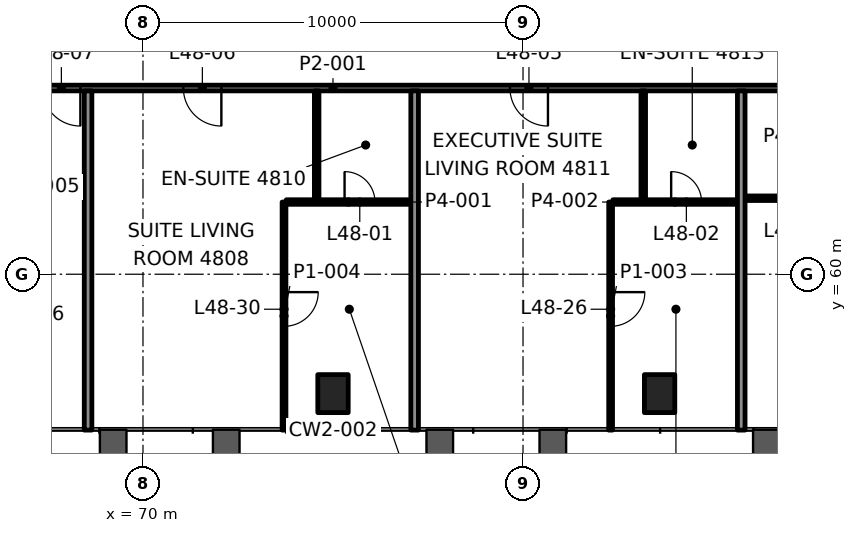
"""IFC4 building model, lengths in metres.
Left out: names, types, materials, properties, quantities, classifications, styles, units other than length and angle.
Written with IfcOpenShell. Run it as: python <this file> out.ifc"""

import sys

from ifc_helpers import new_model, si_unit, direction, frame, frame_2d, origin, origin_2d, place, context, subcontext, project, spatial, rectangle, hollow_rectangle, extrude, element, fill, save


model = new_model("IFC4")
c1 = context("Model", 3, precision=1e-05, world=origin(), true_north=direction((0.0, 1.0)))
c2 = subcontext(c1, "Body", "Model", "MODEL_VIEW")
j1 = project(units=[si_unit("LENGTHUNIT", "METRE"), si_unit("PLANEANGLEUNIT", "RADIAN")], contexts=[c1])
p1 = place(None, origin())
s1 = spatial("IfcSite", under=j1, at=p1, CompositionType="ELEMENT")
p2 = place(p1, origin())
s2 = spatial("IfcBuilding", under=s1, at=p2, CompositionType="ELEMENT")
p3 = place(p2, frame((0.0, 0.0, 206.5)))
s3 = spatial("IfcBuildingStorey", under=s2, at=p3, CompositionType="ELEMENT", Elevation=206.5)
for number, where, z_axis, x_axis in (
    (1, (75.0, 56.858, -0.0), (0.0, 0.0, 1.0), (1.0, 0.0, 0.0)),
    (2, (83.594, 56.858, -0.0), (0.0, 0.0, 1.0), (1.0, 0.0, 0.0)),
):
    element("IfcColumn", number, at=place(p3, frame(where, z_axis=z_axis, x_axis=x_axis)), inside=s3, PredefinedType="COLUMN", context=c2, shape_type="SweptSolid", body=[
        extrude(hollow_rectangle(XDim=0.8, YDim=1.0, WallThickness=0.05, at=origin_2d()), origin(), (0.0, 0.0, 1.0), 3.9),
    ])
p4 = place(p3, frame((73.771, 61.9, 0.0), z_axis=(0.0, 0.0, 1.0), x_axis=(1.0, 0.0, 0.0)))
e3 = element("IfcWall", 3, at=p4, inside=s3, PredefinedType="PARTITIONING", context=c2, shape_type="SweptSolid", body=[
    extrude(rectangle(XDim=3.267, YDim=0.12, at=frame_2d((1.634, 0.0))), origin(), (0.0, 0.0, 1.0), 3.1),
])
p5 = place(p4, frame((1.533, 0.0, 0.0)))
e4 = element("IfcOpeningElement", 4, at=p5, cuts=e3, PredefinedType="OPENING", context=c2, shape_type="SweptSolid", body=[
    extrude(rectangle(XDim=0.8, YDim=2.1, at=frame_2d((0.4, 1.05))), frame((0.0, 0.07, 0.0), z_axis=(0.0, -1.0, 0.0), x_axis=(1.0, 0.0, 0.0)), (0.0, 0.0, 1.0), 0.14),
])
p6 = place(p3, frame((82.365, 61.9, 0.0), z_axis=(0.0, 0.0, 1.0), x_axis=(1.0, 0.0, 0.0)))
e5 = element("IfcWall", 5, at=p6, inside=s3, PredefinedType="PARTITIONING", context=c2, shape_type="SweptSolid", body=[
    extrude(rectangle(XDim=3.267, YDim=0.12, at=frame_2d((1.634, 0.0))), origin(), (0.0, 0.0, 1.0), 3.1),
])
p7 = place(p6, frame((1.533, 0.0, 0.0)))
e6 = element("IfcOpeningElement", 6, at=p7, cuts=e5, PredefinedType="OPENING", context=c2, shape_type="SweptSolid", body=[
    extrude(rectangle(XDim=0.8, YDim=2.1, at=frame_2d((0.4, 1.05))), frame((0.0, 0.07, 0.0), z_axis=(0.0, -1.0, 0.0), x_axis=(1.0, 0.0, 0.0)), (0.0, 0.0, 1.0), 0.14),
])
p8 = place(p3, frame((85.842, 62.0, 0.0), z_axis=(0.0, 0.0, 1.0), x_axis=(1.0, 0.0, 0.0)))
e7 = element("IfcWall", 7, at=p8, inside=s3, PredefinedType="PARTITIONING", context=c2, shape_type="SweptSolid", body=[
    extrude(rectangle(XDim=2.725, YDim=0.12, at=frame_2d((1.363, 0.0))), origin(), (0.0, 0.0, 1.0), 3.1),
])
p9 = place(p8, frame((0.963, 0.0, 0.0)))
e8 = element("IfcOpeningElement", 8, at=p9, cuts=e7, PredefinedType="OPENING", context=c2, shape_type="SweptSolid", body=[
    extrude(rectangle(XDim=0.8, YDim=2.1, at=frame_2d((0.4, 1.05))), frame((0.0, 0.07, 0.0), z_axis=(0.0, -1.0, 0.0), x_axis=(1.0, 0.0, 0.0)), (0.0, 0.0, 1.0), 0.14),
])
p10 = place(p3, frame((88.1, 64.9, 0.0), z_axis=(0.0, 0.0, 1.0), x_axis=(-1.0, 0.0, 0.0)))
e9 = element("IfcWall", 9, at=p10, inside=s3, PredefinedType="PARTITIONING", context=c2, shape_type="SweptSolid", body=[
    extrude(rectangle(XDim=26.2, YDim=0.15, at=frame_2d((13.1, 0.0))), origin(), (0.0, 0.0, 1.0), 3.1),
])
p11 = place(p10, frame((7.443, 0.0, 0.0)))
e10 = element("IfcOpeningElement", 10, at=p11, cuts=e9, PredefinedType="OPENING", context=c2, shape_type="SweptSolid", body=[
    extrude(rectangle(XDim=1.0, YDim=2.1, at=frame_2d((0.5, 1.05))), frame((0.0, 0.085, 0.0), z_axis=(0.0, -1.0, 0.0), x_axis=(1.0, 0.0, 0.0)), (0.0, 0.0, 1.0), 0.17),
])
p12 = place(p10, frame((16.037, 0.0, 0.0)))
e11 = element("IfcOpeningElement", 11, at=p12, cuts=e9, PredefinedType="OPENING", context=c2, shape_type="SweptSolid", body=[
    extrude(rectangle(XDim=1.0, YDim=2.1, at=frame_2d((0.5, 1.05))), frame((0.0, 0.085, 0.0), z_axis=(0.0, -1.0, 0.0), x_axis=(1.0, 0.0, 0.0)), (0.0, 0.0, 1.0), 0.17),
])
p13 = place(p10, frame((19.747, 0.0, 0.0)))
e12 = element("IfcOpeningElement", 12, at=p13, cuts=e9, PredefinedType="OPENING", context=c2, shape_type="SweptSolid", body=[
    extrude(rectangle(XDim=1.0, YDim=2.1, at=frame_2d((0.5, 1.05))), frame((0.0, 0.085, 0.0), z_axis=(0.0, -1.0, 0.0), x_axis=(1.0, 0.0, 0.0)), (0.0, 0.0, 1.0), 0.17),
])
p14 = place(p10, frame((24.013, 0.0, 0.0)))
e13 = element("IfcOpeningElement", 13, at=p14, cuts=e9, PredefinedType="OPENING", context=c2, shape_type="SweptSolid", body=[
    extrude(rectangle(XDim=1.0, YDim=2.1, at=frame_2d((0.5, 1.05))), frame((0.0, 0.085, 0.0), z_axis=(0.0, -1.0, 0.0), x_axis=(1.0, 0.0, 0.0)), (0.0, 0.0, 1.0), 0.17),
])
p15 = place(p3, frame((85.742, 55.898, 0.0), z_axis=(0.0, 0.0, 1.0), x_axis=(0.0, 1.0, 0.0)))
e14 = element("IfcWall", 14, at=p15, inside=s3, PredefinedType="PARTITIONING", context=c2, shape_type="SweptSolid", body=[
    extrude(rectangle(XDim=8.927, YDim=0.2, at=frame_2d((4.463, 0.0))), origin(), (0.0, 0.0, 1.0), 3.022),
])
p16 = place(p3, frame((83.164, 61.96, 0.0), z_axis=(0.0, 0.0, 1.0), x_axis=(0.0, 1.0, 0.0)))
e15 = element("IfcWall", 15, at=p16, inside=s3, PredefinedType="PARTITIONING", context=c2, shape_type="SweptSolid", body=[
    extrude(rectangle(XDim=2.865, YDim=0.12, at=frame_2d((1.433, 0.0))), origin(), (0.0, 0.0, 1.0), 3.1),
])
p17 = place(p3, frame((82.305, 61.9, 0.0), z_axis=(0.0, 0.0, 1.0), x_axis=(0.0, -1.0, 0.0)))
e16 = element("IfcWall", 16, at=p17, inside=s3, PredefinedType="PARTITIONING", context=c2, shape_type="SweptSolid", body=[
    extrude(rectangle(XDim=6.002, YDim=0.1, at=frame_2d((3.001, 0.0))), origin(), (0.0, 0.0, 1.0), 3.022),
])
p18 = place(p17, frame((2.371, 0.0, 0.0)))
e17 = element("IfcOpeningElement", 17, at=p18, cuts=e16, PredefinedType="OPENING", context=c2, shape_type="SweptSolid", body=[
    extrude(rectangle(XDim=0.9, YDim=2.1, at=frame_2d((0.45, 1.05))), frame((0.0, 0.06, 0.0), z_axis=(0.0, -1.0, 0.0), x_axis=(1.0, 0.0, 0.0)), (0.0, 0.0, 1.0), 0.12),
])
p19 = place(p3, frame((77.148, 55.898, 0.0), z_axis=(0.0, 0.0, 1.0), x_axis=(0.0, 1.0, 0.0)))
e18 = element("IfcWall", 18, at=p19, inside=s3, PredefinedType="PARTITIONING", context=c2, shape_type="SweptSolid", body=[
    extrude(rectangle(XDim=8.927, YDim=0.2, at=frame_2d((4.463, 0.0))), origin(), (0.0, 0.0, 1.0), 3.022),
])
p20 = place(p3, frame((74.57, 61.96, 0.0), z_axis=(0.0, 0.0, 1.0), x_axis=(0.0, 1.0, 0.0)))
e19 = element("IfcWall", 19, at=p20, inside=s3, PredefinedType="PARTITIONING", context=c2, shape_type="SweptSolid", body=[
    extrude(rectangle(XDim=2.865, YDim=0.12, at=frame_2d((1.433, 0.0))), origin(), (0.0, 0.0, 1.0), 3.1),
])
p21 = place(p3, frame((73.711, 61.9, 0.0), z_axis=(0.0, 0.0, 1.0), x_axis=(0.0, -1.0, 0.0)))
e20 = element("IfcWall", 20, at=p21, inside=s3, PredefinedType="PARTITIONING", context=c2, shape_type="SweptSolid", body=[
    extrude(rectangle(XDim=6.002, YDim=0.1, at=frame_2d((3.001, 0.0))), origin(), (0.0, 0.0, 1.0), 3.022),
])
p22 = place(p21, frame((2.371, 0.0, 0.0)))
e21 = element("IfcOpeningElement", 21, at=p22, cuts=e20, PredefinedType="OPENING", context=c2, shape_type="SweptSolid", body=[
    extrude(rectangle(XDim=0.9, YDim=2.1, at=frame_2d((0.45, 1.05))), frame((0.0, 0.06, 0.0), z_axis=(0.0, -1.0, 0.0), x_axis=(1.0, 0.0, 0.0)), (0.0, 0.0, 1.0), 0.12),
])
p23 = place(p3, frame((68.555, 55.898, 0.0), z_axis=(0.0, 0.0, 1.0), x_axis=(0.0, 1.0, 0.0)))
e22 = element("IfcWall", 22, at=p23, inside=s3, PredefinedType="PARTITIONING", context=c2, shape_type="SweptSolid", body=[
    extrude(rectangle(XDim=8.927, YDim=0.2, at=frame_2d((4.463, 0.0))), origin(), (0.0, 0.0, 1.0), 3.022),
])
p24 = place(p5, origin())
e23 = element("IfcDoor", 23, at=p24, inside=s3, OperationType="SINGLE_SWING_LEFT", PredefinedType="DOOR", context=c2, shape_type="SweptSolid", body=[
    extrude(rectangle(XDim=0.8, YDim=2.1, at=frame_2d((0.4, 1.05))), frame((0.0, 0.025, 0.0), z_axis=(0.0, -1.0, 0.0), x_axis=(1.0, 0.0, 0.0)), (0.0, 0.0, 1.0), 0.05),
])
fill(e4, e23)
p25 = place(p7, origin())
e24 = element("IfcDoor", 24, at=p25, inside=s3, OperationType="SINGLE_SWING_RIGHT", PredefinedType="DOOR", context=c2, shape_type="SweptSolid", body=[
    extrude(rectangle(XDim=0.8, YDim=2.1, at=frame_2d((0.4, 1.05))), frame((0.0, 0.025, 0.0), z_axis=(0.0, -1.0, 0.0), x_axis=(1.0, 0.0, 0.0)), (0.0, 0.0, 1.0), 0.05),
])
fill(e6, e24)
p26 = place(p11, origin())
e25 = element("IfcDoor", 25, at=p26, inside=s3, OperationType="SINGLE_SWING_LEFT", PredefinedType="DOOR", context=c2, shape_type="SweptSolid", body=[
    extrude(rectangle(XDim=1.0, YDim=2.1, at=frame_2d((0.5, 1.05))), frame((0.0, 0.025, 0.0), z_axis=(0.0, -1.0, 0.0), x_axis=(1.0, 0.0, 0.0)), (0.0, 0.0, 1.0), 0.05),
])
fill(e10, e25)
p27 = place(p12, origin())
e26 = element("IfcDoor", 26, at=p27, inside=s3, OperationType="SINGLE_SWING_RIGHT", PredefinedType="DOOR", context=c2, shape_type="SweptSolid", body=[
    extrude(rectangle(XDim=1.0, YDim=2.1, at=frame_2d((0.5, 1.05))), frame((0.0, 0.025, 0.0), z_axis=(0.0, -1.0, 0.0), x_axis=(1.0, 0.0, 0.0)), (0.0, 0.0, 1.0), 0.05),
])
fill(e11, e26)
p28 = place(p13, origin())
e27 = element("IfcDoor", 27, at=p28, inside=s3, OperationType="SINGLE_SWING_RIGHT", PredefinedType="DOOR", context=c2, shape_type="SweptSolid", body=[
    extrude(rectangle(XDim=1.0, YDim=2.1, at=frame_2d((0.5, 1.05))), frame((0.0, 0.025, 0.0), z_axis=(0.0, -1.0, 0.0), x_axis=(1.0, 0.0, 0.0)), (0.0, 0.0, 1.0), 0.05),
])
fill(e12, e27)
p29 = place(p18, origin())
e28 = element("IfcDoor", 28, at=p29, inside=s3, OperationType="SINGLE_SWING_RIGHT", PredefinedType="DOOR", context=c2, shape_type="SweptSolid", body=[
    extrude(rectangle(XDim=0.9, YDim=2.1, at=frame_2d((0.45, 1.05))), frame((0.0, 0.025, 0.0), z_axis=(0.0, -1.0, 0.0), x_axis=(1.0, 0.0, 0.0)), (0.0, 0.0, 1.0), 0.05),
])
fill(e17, e28)
p30 = place(p22, origin())
e29 = element("IfcDoor", 29, at=p30, inside=s3, OperationType="SINGLE_SWING_LEFT", PredefinedType="DOOR", context=c2, shape_type="SweptSolid", body=[
    extrude(rectangle(XDim=0.9, YDim=2.1, at=frame_2d((0.45, 1.05))), frame((0.0, 0.025, 0.0), z_axis=(0.0, -1.0, 0.0), x_axis=(1.0, 0.0, 0.0)), (0.0, 0.0, 1.0), 0.05),
])
fill(e21, e29)
save(model, sys.argv[1])
